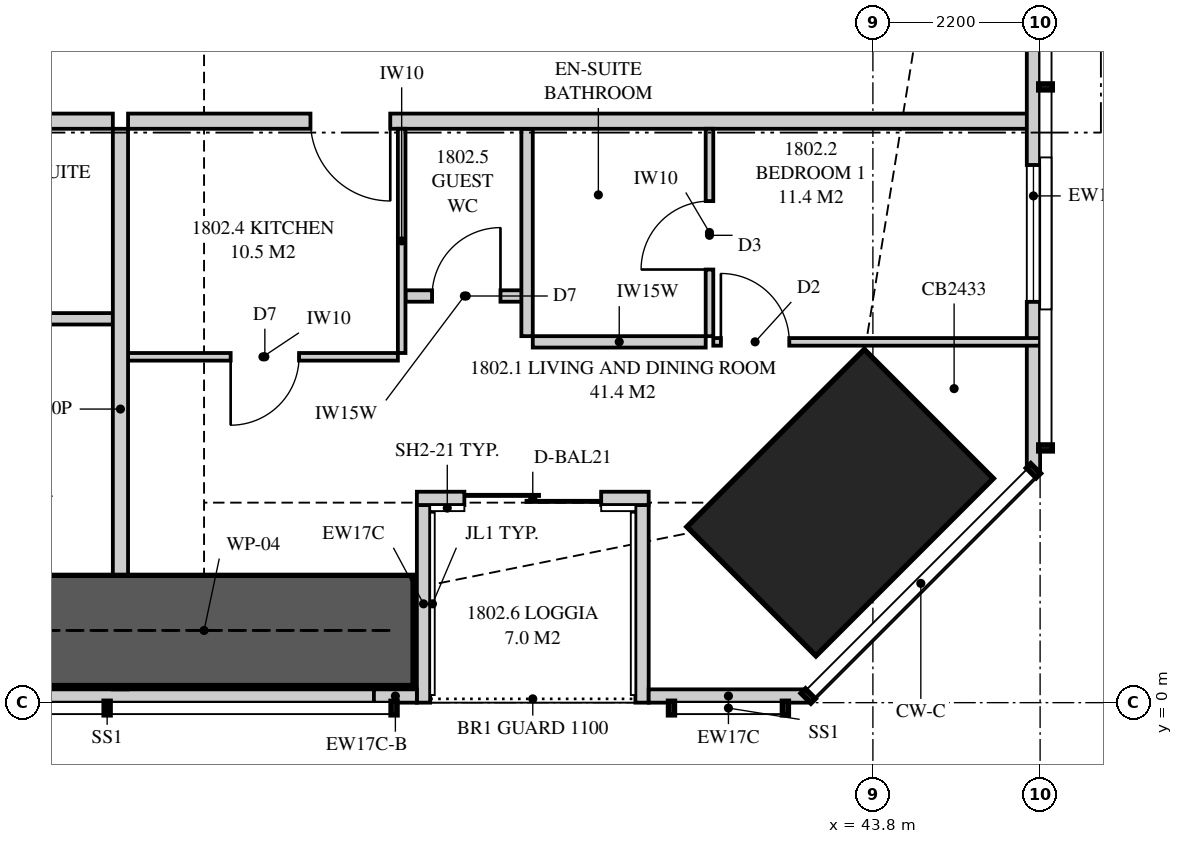
"""IFC4 building model, lengths in metres.
Left out: names, types, materials, properties, quantities, classifications, styles, units other than length and angle.
Written with IfcOpenShell. Run it as: python <this file> out.ifc"""

import sys

from ifc_helpers import new_model, si_unit, direction, frame, frame_2d, origin, origin_2d, place, context, subcontext, project, spatial, polyline, rectangle, hollow_rectangle, outline, extrude, element, fill, save


model = new_model("IFC4")
c1 = context("Model", 3, precision=1e-05, world=origin(), true_north=direction((0.0, 1.0)))
c2 = subcontext(c1, "Body", "Model", "MODEL_VIEW")
j1 = project(units=[si_unit("LENGTHUNIT", "METRE"), si_unit("PLANEANGLEUNIT", "RADIAN")], contexts=[c1])
p1 = place(None, origin())
s1 = spatial("IfcSite", under=j1, at=p1, CompositionType="ELEMENT")
p2 = place(p1, origin())
s2 = spatial("IfcBuilding", under=s1, at=p2, CompositionType="ELEMENT")
p3 = place(p2, frame((0.0, 0.0, 67.9)))
s3 = spatial("IfcBuildingStorey", under=s2, at=p3, CompositionType="ELEMENT", Elevation=67.9)
p4 = place(p3, frame((43.369, 2.631, 0.0), z_axis=(0.0, 0.0, 1.0), x_axis=(-0.707106781187, 0.707106781187, 0.0)))
e1 = element("IfcColumn", 1, at=p4, inside=s3, PredefinedType="COLUMN", context=c2, shape_type="SweptSolid", body=[
    extrude(hollow_rectangle(XDim=2.4, YDim=3.3, WallThickness=0.125, at=origin_2d()), origin(), (0.0, 0.0, 1.0), 3.35),
])
p5 = place(p3, frame((20.525, 0.087, 0.0), z_axis=(0.0, 0.0, 1.0), x_axis=(1.0, 0.0, 0.0)))
e2 = element("IfcWall", 2, at=p5, inside=s3, PredefinedType="SOLIDWALL", context=c2, shape_type="SweptSolid", body=[
    extrude(rectangle(XDim=16.71, YDim=0.175, at=frame_2d((8.355, 0.0))), origin(), (0.0, 0.0, 1.0), 2.15),
])
p6 = place(p5, frame((6.775, 0.0, 0.4)))
e3 = element("IfcOpeningElement", 3, at=p6, cuts=e2, PredefinedType="OPENING", context=c2, shape_type="SweptSolid", body=[
    extrude(rectangle(XDim=1.8, YDim=1.7, at=frame_2d((0.9, 0.85))), frame((0.0, 0.097, 0.0), z_axis=(0.0, -1.0, 0.0), x_axis=(1.0, 0.0, 0.0)), (0.0, 0.0, 1.0), 0.195),
])
p7 = place(p5, frame((9.81, 0.0, 0.4)))
e4 = element("IfcOpeningElement", 4, at=p7, cuts=e2, PredefinedType="OPENING", context=c2, shape_type="SweptSolid", body=[
    extrude(rectangle(XDim=1.8, YDim=1.7, at=frame_2d((0.9, 0.85))), frame((0.0, 0.097, 0.0), z_axis=(0.0, -1.0, 0.0), x_axis=(1.0, 0.0, 0.0)), (0.0, 0.0, 1.0), 0.195),
])
p8 = place(p3, frame((37.235, 0.087, 0.0), z_axis=(0.0, 0.0, 1.0), x_axis=(1.0, 0.0, 0.0)))
e5 = element("IfcWall", 5, at=p8, inside=s3, PredefinedType="SOLIDWALL", context=c2, shape_type="SweptSolid", body=[
    extrude(rectangle(XDim=0.565, YDim=0.175, at=frame_2d((0.283, 0.0))), origin(), (0.0, 0.0, 1.0), 3.11),
])
p9 = place(p3, frame((40.85, 0.087, 0.0), z_axis=(0.0, 0.0, 1.0), x_axis=(1.0, 0.0, 0.0)))
e6 = element("IfcWall", 6, at=p9, inside=s3, PredefinedType="SOLIDWALL", context=c2, shape_type="SweptSolid", body=[
    extrude(rectangle(XDim=2.099, YDim=0.175, at=frame_2d((1.049, 0.0))), origin(), (0.0, 0.0, 1.0), 3.11),
])
p10 = place(p3, frame((37.8, 2.688, 0.0), z_axis=(0.0, 0.0, 1.0), x_axis=(1.0, 0.0, 0.0)))
e7 = element("IfcWall", 7, at=p10, inside=s3, PredefinedType="SOLIDWALL", context=c2, shape_type="SweptSolid", body=[
    extrude(rectangle(XDim=3.05, YDim=0.175, at=frame_2d((1.525, 0.0))), origin(), (0.0, 0.0, 1.0), 2.15),
])
p11 = place(p10, frame((0.625, 0.0, 0.0)))
e8 = element("IfcOpeningElement", 8, at=p11, cuts=e7, PredefinedType="OPENING", context=c2, shape_type="SweptSolid", body=[
    extrude(rectangle(XDim=1.8, YDim=2.1, at=frame_2d((0.9, 1.05))), frame((0.0, 0.097, 0.0), z_axis=(0.0, -1.0, 0.0), x_axis=(1.0, 0.0, 0.0)), (0.0, 0.0, 1.0), 0.195),
])
p12 = place(p3, frame((37.887, 0.0, 0.0), z_axis=(0.0, 0.0, 1.0), x_axis=(0.0, 1.0, 0.0)))
e9 = element("IfcWall", 9, at=p12, inside=s3, PredefinedType="SOLIDWALL", context=c2, shape_type="SweptSolid", body=[
    extrude(outline(polyline([(0.0, 0.0), (2.6, 0.0), (2.6, 2.15), (0.289, 2.15), (0.289, 3.11), (0.0, 3.11), (0.0, 0.0)])), frame((0.0, 0.087, 0.0), z_axis=(0.0, -1.0, 0.0), x_axis=(1.0, 0.0, 0.0)), (0.0, 0.0, 1.0), 0.175),
])
p13 = place(p3, frame((40.762, 0.0, 0.0), z_axis=(0.0, 0.0, 1.0), x_axis=(0.0, 1.0, 0.0)))
e10 = element("IfcWall", 10, at=p13, inside=s3, PredefinedType="SOLIDWALL", context=c2, shape_type="SweptSolid", body=[
    extrude(outline(polyline([(0.0, 0.0), (2.6, 0.0), (2.6, 2.15), (0.866, 2.15), (0.866, 3.11), (0.0, 3.11), (0.0, 0.0)])), frame((0.0, 0.087, 0.0), z_axis=(0.0, -1.0, 0.0), x_axis=(1.0, 0.0, 0.0)), (0.0, 0.0, 1.0), 0.175),
])
p14 = place(p3, frame((45.913, 3.051, 0.0), z_axis=(0.0, 0.0, 1.0), x_axis=(0.0, 1.0, 0.0)))
e11 = element("IfcWall", 11, at=p14, inside=s3, PredefinedType="SOLIDWALL", context=c2, shape_type="SweptSolid", body=[
    extrude(rectangle(XDim=7.231, YDim=0.175, at=frame_2d((3.616, 0.0))), origin(), (0.0, 0.0, 1.0), 3.11),
])
p15 = place(p14, frame((2.222, 0.0, 0.4)))
e12 = element("IfcOpeningElement", 12, at=p15, cuts=e11, PredefinedType="OPENING", context=c2, shape_type="SweptSolid", body=[
    extrude(rectangle(XDim=1.8, YDim=1.7, at=frame_2d((0.9, 0.85))), frame((0.0, 0.097, 0.0), z_axis=(0.0, -1.0, 0.0), x_axis=(1.0, 0.0, 0.0)), (0.0, 0.0, 1.0), 0.195),
])
p16 = place(p3, frame((33.9, 0.175, 0.0), z_axis=(0.0, 0.0, 1.0), x_axis=(0.0, 1.0, 0.0)))
e13 = element("IfcWall", 13, at=p16, inside=s3, PredefinedType="PARTITIONING", context=c2, shape_type="SweptSolid", body=[
    extrude(outline(polyline([(0.529, 2.15), (0.0, 2.15), (0.0, 0.0), (0.529, 0.0), (0.529, 0.752), (1.021, 0.752), (1.021, 0.0), (7.375, 0.0), (7.375, 3.11), (2.085, 3.11), (2.085, 2.15), (1.021, 2.15), (1.021, 1.398), (0.529, 1.398), (0.529, 2.15)])), frame((0.0, 0.1, 0.0), z_axis=(0.0, -1.0, 0.0), x_axis=(1.0, 0.0, 0.0)), (0.0, 0.0, 1.0), 0.2),
])
p17 = place(p3, frame((17.725, 7.65, 0.0), z_axis=(0.0, 0.0, 1.0), x_axis=(1.0, 0.0, 0.0)))
e14 = element("IfcWall", 14, at=p17, inside=s3, PredefinedType="PARTITIONING", context=c2, shape_type="SweptSolid", body=[
    extrude(outline(polyline([(0.0, 0.0), (16.075, 0.0), (16.075, 3.11), (6.612, 3.11), (6.612, 2.541), (5.938, 2.541), (5.938, 3.11), (0.0, 3.11), (0.0, 0.0)])), frame((0.0, 0.1, 0.0), z_axis=(0.0, -1.0, 0.0), x_axis=(1.0, 0.0, 0.0)), (0.0, 0.0, 1.0), 0.2),
])
p18 = place(p17, frame((0.2, 0.0, 0.0)))
e15 = element("IfcOpeningElement", 15, at=p18, cuts=e14, PredefinedType="OPENING", context=c2, shape_type="SweptSolid", body=[
    extrude(rectangle(XDim=1.05, YDim=2.2, at=frame_2d((0.525, 1.1))), frame((0.0, 0.11, 0.0), z_axis=(0.0, -1.0, 0.0), x_axis=(1.0, 0.0, 0.0)), (0.0, 0.0, 1.0), 0.22),
])
p19 = place(p3, frame((29.95, 5.05, 0.0), z_axis=(0.0, 0.0, 1.0), x_axis=(1.0, 0.0, 0.0)))
e16 = element("IfcWall", 16, at=p19, inside=s3, PredefinedType="PLUMBINGWALL", context=c2, shape_type="SweptSolid", body=[
    extrude(rectangle(XDim=3.85, YDim=0.15, at=frame_2d((1.925, 0.0))), origin(), (0.0, 0.0, 1.0), 3.11),
])
p20 = place(p19, frame((0.4, 0.0, 0.0)))
e17 = element("IfcOpeningElement", 17, at=p20, cuts=e16, PredefinedType="OPENING", context=c2, shape_type="SweptSolid", body=[
    extrude(rectangle(XDim=0.9, YDim=2.1, at=frame_2d((0.45, 1.05))), frame((0.0, 0.085, 0.0), z_axis=(0.0, -1.0, 0.0), x_axis=(1.0, 0.0, 0.0)), (0.0, 0.0, 1.0), 0.17),
])
p21 = place(p3, frame((34.0, 7.65, 0.0), z_axis=(0.0, 0.0, 1.0), x_axis=(1.0, 0.0, 0.0)))
e18 = element("IfcWall", 18, at=p21, inside=s3, PredefinedType="PARTITIONING", context=c2, shape_type="SweptSolid", body=[
    extrude(outline(polyline([(0.0, 0.0), (12.0, 0.0), (12.0, 3.11), (11.51, 3.11), (11.51, 2.15), (8.855, 2.15), (8.855, 3.11), (1.337, 3.11), (1.337, 2.541), (0.663, 2.541), (0.663, 3.11), (0.0, 3.11), (0.0, 0.0)])), frame((0.0, 0.1, 0.0), z_axis=(0.0, -1.0, 0.0), x_axis=(1.0, 0.0, 0.0)), (0.0, 0.0, 1.0), 0.2),
])
p22 = place(p21, frame((2.4, 0.0, 0.0)))
e19 = element("IfcOpeningElement", 19, at=p22, cuts=e18, PredefinedType="OPENING", context=c2, shape_type="SweptSolid", body=[
    extrude(rectangle(XDim=1.05, YDim=2.2, at=frame_2d((0.525, 1.1))), frame((0.0, 0.11, 0.0), z_axis=(0.0, -1.0, 0.0), x_axis=(1.0, 0.0, 0.0)), (0.0, 0.0, 1.0), 0.22),
])
p23 = place(p3, frame((41.65, 4.822, 0.0), z_axis=(0.0, 0.0, 1.0), x_axis=(0.0, 1.0, 0.0)))
e20 = element("IfcWall", 20, at=p23, inside=s3, PredefinedType="PARTITIONING", context=c2, shape_type="SweptSolid", body=[
    extrude(rectangle(XDim=2.728, YDim=0.1, at=frame_2d((1.364, 0.0))), origin(), (0.0, 0.0, 1.0), 3.11),
])
p24 = place(p23, frame((0.877, 0.0, 0.0)))
e21 = element("IfcOpeningElement", 21, at=p24, cuts=e20, PredefinedType="OPENING", context=c2, shape_type="SweptSolid", body=[
    extrude(rectangle(XDim=0.9, YDim=2.1, at=frame_2d((0.45, 1.05))), frame((0.0, 0.06, 0.0), z_axis=(0.0, -1.0, 0.0), x_axis=(1.0, 0.0, 0.0)), (0.0, 0.0, 1.0), 0.12),
])
p25 = place(p3, frame((41.7, 4.747, 0.0), z_axis=(0.0, 0.0, 1.0), x_axis=(1.0, 0.0, 0.0)))
e22 = element("IfcWall", 22, at=p25, inside=s3, PredefinedType="PARTITIONING", context=c2, shape_type="SweptSolid", body=[
    extrude(outline(polyline([(0.0, 0.0), (4.3, 0.0), (4.3, 3.11), (3.288, 3.11), (3.288, 2.15), (0.735, 2.15), (0.735, 3.11), (0.0, 3.11), (0.0, 0.0)])), frame((0.0, 0.05, 0.0), z_axis=(0.0, -1.0, 0.0), x_axis=(1.0, 0.0, 0.0)), (0.0, 0.0, 1.0), 0.1),
])
p26 = place(p25, frame((0.1, 0.0, 0.0)))
e23 = element("IfcOpeningElement", 23, at=p26, cuts=e22, PredefinedType="OPENING", context=c2, shape_type="SweptSolid", body=[
    extrude(rectangle(XDim=0.9, YDim=2.1, at=frame_2d((0.45, 1.05))), frame((0.0, 0.06, 0.0), z_axis=(0.0, -1.0, 0.0), x_axis=(1.0, 0.0, 0.0)), (0.0, 0.0, 1.0), 0.12),
])
p27 = place(p3, frame((39.325, 4.747, 0.0), z_axis=(0.0, 0.0, 1.0), x_axis=(1.0, 0.0, 0.0)))
e24 = element("IfcWall", 24, at=p27, inside=s3, PredefinedType="PLUMBINGWALL", context=c2, shape_type="SweptSolid", body=[
    extrude(rectangle(XDim=2.275, YDim=0.15, at=frame_2d((1.138, 0.0))), origin(), (0.0, 0.0, 1.0), 3.11),
])
p28 = place(p3, frame((39.25, 4.822, 0.0), z_axis=(0.0, 0.0, 1.0), x_axis=(0.0, 1.0, 0.0)))
e25 = element("IfcWall", 25, at=p28, inside=s3, PredefinedType="PLUMBINGWALL", context=c2, shape_type="SweptSolid", body=[
    extrude(rectangle(XDim=2.728, YDim=0.15, at=frame_2d((1.364, 0.0))), origin(), (0.0, 0.0, 1.0), 3.11),
])
p29 = place(p3, frame((34.0, 4.55, 0.0), z_axis=(0.0, 0.0, 1.0), x_axis=(1.0, 0.0, 0.0)))
e26 = element("IfcWall", 26, at=p29, inside=s3, PredefinedType="PARTITIONING", context=c2, shape_type="SweptSolid", body=[
    extrude(outline(polyline([(0.0, 0.0), (3.55, 0.0), (3.55, 3.11), (1.287, 3.11), (1.287, 2.541), (0.713, 2.541), (0.713, 3.11), (0.0, 3.11), (0.0, 0.0)])), frame((0.0, 0.05, 0.0), z_axis=(0.0, -1.0, 0.0), x_axis=(1.0, 0.0, 0.0)), (0.0, 0.0, 1.0), 0.1),
])
p30 = place(p29, frame((1.35, 0.0, 0.0)))
e27 = element("IfcOpeningElement", 27, at=p30, cuts=e26, PredefinedType="OPENING", context=c2, shape_type="SweptSolid", body=[
    extrude(rectangle(XDim=0.9, YDim=2.1, at=frame_2d((0.45, 1.05))), frame((0.0, 0.06, 0.0), z_axis=(0.0, -1.0, 0.0), x_axis=(1.0, 0.0, 0.0)), (0.0, 0.0, 1.0), 0.12),
])
p31 = place(p3, frame((37.6, 4.6, 0.0), z_axis=(0.0, 0.0, 1.0), x_axis=(0.0, 1.0, 0.0)))
e28 = element("IfcWall", 28, at=p31, inside=s3, PredefinedType="PARTITIONING", context=c2, shape_type="SweptSolid", body=[
    extrude(rectangle(XDim=2.95, YDim=0.1, at=frame_2d((1.475, 0.0))), origin(), (0.0, 0.0, 1.0), 3.11),
])
p32 = place(p3, frame((37.65, 5.35, 0.0), z_axis=(0.0, 0.0, 1.0), x_axis=(1.0, 0.0, 0.0)))
e29 = element("IfcWall", 29, at=p32, inside=s3, PredefinedType="PLUMBINGWALL", context=c2, shape_type="SweptSolid", body=[
    extrude(rectangle(XDim=1.55, YDim=0.15, at=frame_2d((0.775, 0.0))), origin(), (0.0, 0.0, 1.0), 3.11),
])
p33 = place(p32, frame((0.35, 0.0, 0.0)))
e30 = element("IfcOpeningElement", 30, at=p33, cuts=e29, PredefinedType="OPENING", context=c2, shape_type="SweptSolid", body=[
    extrude(rectangle(XDim=0.9, YDim=2.1, at=frame_2d((0.45, 1.05))), frame((0.0, 0.085, 0.0), z_axis=(0.0, -1.0, 0.0), x_axis=(1.0, 0.0, 0.0)), (0.0, 0.0, 1.0), 0.17),
])
p34 = place(p3, frame((32.25, 0.95, 0.0), z_axis=(0.0, 0.0, 1.0), x_axis=(1.0, 0.0, 0.0)))
e31 = element("IfcWall", 31, at=p34, inside=s3, PredefinedType="SHEAR", context=c2, shape_type="SweptSolid", body=[
    extrude(rectangle(XDim=5.5, YDim=1.45, at=frame_2d((2.75, 0.0))), origin(), (0.0, 0.0, 1.0), 3.35),
])
p35 = place(p11, origin())
e32 = element("IfcDoor", 32, at=p35, inside=s3, OperationType="SLIDING_TO_LEFT", PredefinedType="DOOR", context=c2, shape_type="SweptSolid", body=[
    extrude(rectangle(XDim=1.8, YDim=2.1, at=frame_2d((0.9, 1.05))), frame((0.0, 0.025, 0.0), z_axis=(0.0, -1.0, 0.0), x_axis=(1.0, 0.0, 0.0)), (0.0, 0.0, 1.0), 0.05),
])
fill(e8, e32)
p36 = place(p15, origin())
e33 = element("IfcWindow", 33, at=p36, inside=s3, PartitioningType="SINGLE_PANEL", PredefinedType="WINDOW", context=c2, shape_type="SweptSolid", body=[
    extrude(rectangle(XDim=1.8, YDim=1.7, at=frame_2d((0.9, 0.85))), frame((0.0, 0.03, 0.0), z_axis=(0.0, -1.0, 0.0), x_axis=(1.0, 0.0, 0.0)), (0.0, 0.0, 1.0), 0.06),
])
fill(e12, e33)
p37 = place(p22, frame((1.05, 0.0, 0.0), z_axis=(0.0, 0.0, 1.0), x_axis=(-1.0, 0.0, 0.0)))
e34 = element("IfcDoor", 34, at=p37, inside=s3, OperationType="SINGLE_SWING_LEFT", PredefinedType="DOOR", context=c2, shape_type="SweptSolid", body=[
    extrude(rectangle(XDim=1.05, YDim=2.2, at=frame_2d((0.525, 1.1))), frame((0.0, 0.025, 0.0), z_axis=(0.0, -1.0, 0.0), x_axis=(1.0, 0.0, 0.0)), (0.0, 0.0, 1.0), 0.05),
])
fill(e19, e34)
p38 = place(p26, origin())
e35 = element("IfcDoor", 35, at=p38, inside=s3, OperationType="SINGLE_SWING_LEFT", PredefinedType="DOOR", context=c2, shape_type="SweptSolid", body=[
    extrude(rectangle(XDim=0.9, YDim=2.1, at=frame_2d((0.45, 1.05))), frame((0.0, 0.025, 0.0), z_axis=(0.0, -1.0, 0.0), x_axis=(1.0, 0.0, 0.0)), (0.0, 0.0, 1.0), 0.05),
])
fill(e23, e35)
p39 = place(p24, origin())
e36 = element("IfcDoor", 36, at=p39, inside=s3, OperationType="SINGLE_SWING_LEFT", PredefinedType="DOOR", context=c2, shape_type="SweptSolid", body=[
    extrude(rectangle(XDim=0.9, YDim=2.1, at=frame_2d((0.45, 1.05))), frame((0.0, 0.025, 0.0), z_axis=(0.0, -1.0, 0.0), x_axis=(1.0, 0.0, 0.0)), (0.0, 0.0, 1.0), 0.05),
])
fill(e21, e36)
p40 = place(p30, frame((0.9, 0.0, 0.0), z_axis=(0.0, 0.0, 1.0), x_axis=(-1.0, 0.0, 0.0)))
e37 = element("IfcDoor", 37, at=p40, inside=s3, OperationType="SINGLE_SWING_RIGHT", PredefinedType="DOOR", context=c2, shape_type="SweptSolid", body=[
    extrude(rectangle(XDim=0.9, YDim=2.1, at=frame_2d((0.45, 1.05))), frame((0.0, 0.025, 0.0), z_axis=(0.0, -1.0, 0.0), x_axis=(1.0, 0.0, 0.0)), (0.0, 0.0, 1.0), 0.05),
])
fill(e27, e37)
p41 = place(p33, origin())
e38 = element("IfcDoor", 38, at=p41, inside=s3, OperationType="SINGLE_SWING_RIGHT", PredefinedType="DOOR", context=c2, shape_type="SweptSolid", body=[
    extrude(rectangle(XDim=0.9, YDim=2.1, at=frame_2d((0.45, 1.05))), frame((0.0, 0.025, 0.0), z_axis=(0.0, -1.0, 0.0), x_axis=(1.0, 0.0, 0.0)), (0.0, 0.0, 1.0), 0.05),
])
fill(e30, e38)
save(model, sys.argv[1])
